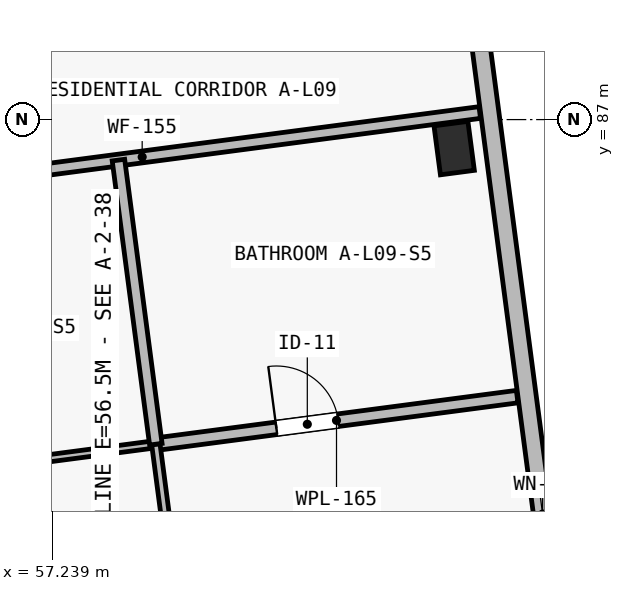
"""IFC4 building model, lengths in metres.
Left out: names, types, materials, properties, quantities, classifications, styles, units other than length and angle.
Written with IfcOpenShell. Run it as: python <this file> out.ifc"""

import sys

from ifc_helpers import new_model, si_unit, direction, frame, frame_2d, origin, origin_2d, place, context, subcontext, project, spatial, rectangle, extrude, element, fill, save


model = new_model("IFC4")
c1 = context("Model", 3, precision=1e-05, world=origin(), true_north=direction((0.0, 1.0)))
c2 = subcontext(c1, "Body", "Model", "MODEL_VIEW")
j1 = project(units=[si_unit("LENGTHUNIT", "METRE"), si_unit("PLANEANGLEUNIT", "RADIAN")], contexts=[c1])
p1 = place(None, origin())
s1 = spatial("IfcSite", under=j1, at=p1, CompositionType="ELEMENT")
p2 = place(p1, origin())
s2 = spatial("IfcBuilding", under=s1, at=p2, CompositionType="ELEMENT")
p3 = place(p2, frame((0.0, 0.0, 31.15)))
s3 = spatial("IfcBuildingStorey", under=s2, at=p3, CompositionType="ELEMENT", Elevation=31.15)
p4 = place(p3, frame((62.53, 86.625, 0.0), z_axis=(0.0, 0.0, 1.0), x_axis=(0.991444861374, 0.13052619222, 0.0)))
e1 = element("IfcColumn", 1, at=p4, inside=s3, PredefinedType="COLUMN", context=c2, shape_type="SweptSolid", body=[
    extrude(rectangle(XDim=0.45, YDim=0.65, at=origin_2d()), origin(), (0.0, 0.0, 1.0), 3.25),
])
p5 = place(p3, frame((61.39, 99.31, 0.0), z_axis=(0.0, 0.0, 1.0), x_axis=(0.13052411616, -0.99144513469, 0.0)))
e2 = element("IfcWall", 2, at=p5, inside=s3, PredefinedType="SOLIDWALL", context=c2, shape_type="SweptSolid", body=[
    extrude(rectangle(XDim=21.05, YDim=0.24, at=frame_2d((10.525, 0.0))), origin(), (0.0, 0.0, 1.0), 3.0),
])
p6 = place(p5, frame((2.63, 0.0, 0.52)))
e3 = element("IfcOpeningElement", 3, at=p6, cuts=e2, PredefinedType="OPENING", context=c2, shape_type="SweptSolid", body=[
    extrude(rectangle(XDim=0.68, YDim=2.24, at=frame_2d((0.34, 1.12))), frame((0.0, 0.135, 0.0), z_axis=(0.0, -1.0, 0.0), x_axis=(1.0, 0.0, 0.0)), (0.0, 0.0, 1.0), 0.27),
])
p7 = place(p5, frame((17.24, 0.0, 0.45)))
e4 = element("IfcOpeningElement", 4, at=p7, cuts=e2, PredefinedType="OPENING", context=c2, shape_type="SweptSolid", body=[
    extrude(rectangle(XDim=0.82, YDim=2.18, at=frame_2d((0.41, 1.09))), frame((0.0, 0.135, 0.0), z_axis=(0.0, -1.0, 0.0), x_axis=(1.0, 0.0, 0.0)), (0.0, 0.0, 1.0), 0.27),
])
p8 = place(p3, frame((53.984, 85.924, 0.0), z_axis=(0.0, 0.0, 1.0), x_axis=(0.991445946609, 0.130517948779, 0.0)))
e5 = element("IfcWall", 5, at=p8, inside=s3, PredefinedType="PARTITIONING", context=c2, shape_type="SweptSolid", body=[
    extrude(rectangle(XDim=8.96, YDim=0.155, at=frame_2d((4.48, 0.0))), origin(), (0.0, 0.0, 1.0), 2.97),
])
p9 = place(p8, frame((1.655, 0.0, 0.0)))
e6 = element("IfcOpeningElement", 6, at=p9, cuts=e5, PredefinedType="OPENING", context=c2, shape_type="SweptSolid", body=[
    extrude(rectangle(XDim=1.02, YDim=2.2, at=frame_2d((0.51, 1.1))), frame((0.0, 0.093, 0.0), z_axis=(0.0, -1.0, 0.0), x_axis=(1.0, 0.0, 0.0)), (0.0, 0.0, 1.0), 0.185),
])
p10 = place(p3, frame((54.357, 82.17, 0.0), z_axis=(0.0, 0.0, 1.0), x_axis=(0.991444014242, 0.130532626667, 0.0)))
e7 = element("IfcWall", 7, at=p10, inside=s3, PredefinedType="PARTITIONING", context=c2, shape_type="SweptSolid", body=[
    extrude(rectangle(XDim=4.285, YDim=0.095, at=frame_2d((2.143, 0.0))), origin(), (0.0, 0.0, 1.0), 2.97),
])
p11 = place(p10, frame((1.825, 0.0, 0.0)))
e8 = element("IfcOpeningElement", 8, at=p11, cuts=e7, PredefinedType="OPENING", context=c2, shape_type="SweptSolid", body=[
    extrude(rectangle(XDim=0.9, YDim=2.1, at=frame_2d((0.45, 1.05))), frame((0.0, 0.062, 0.0), z_axis=(0.0, -1.0, 0.0), x_axis=(1.0, 0.0, 0.0)), (0.0, 0.0, 1.0), 0.125),
])
p12 = place(p3, frame((58.605, 82.729, 0.0), z_axis=(0.0, 0.0, 1.0), x_axis=(0.991449269254, 0.130492706676, 0.0)))
e9 = element("IfcWall", 9, at=p12, inside=s3, PredefinedType="PLUMBINGWALL", context=c2, shape_type="SweptSolid", body=[
    extrude(rectangle(XDim=4.795, YDim=0.165, at=frame_2d((2.397, 0.0))), origin(), (0.0, 0.0, 1.0), 2.97),
])
p13 = place(p12, frame((1.6, 0.0, 0.0)))
e10 = element("IfcOpeningElement", 10, at=p13, cuts=e9, PredefinedType="OPENING", context=c2, shape_type="SweptSolid", body=[
    extrude(rectangle(XDim=0.82, YDim=2.08, at=frame_2d((0.41, 1.04))), frame((0.0, 0.097, 0.0), z_axis=(0.0, -1.0, 0.0), x_axis=(1.0, 0.0, 0.0)), (0.0, 0.0, 1.0), 0.195),
])
p14 = place(p3, frame((59.237, 77.931, 0.0), z_axis=(0.0, 0.0, 1.0), x_axis=(-0.130544545786, 0.991442444908, 0.0)))
e11 = element("IfcWall", 11, at=p14, inside=s3, PredefinedType="PARTITIONING", context=c2, shape_type="SweptSolid", body=[
    extrude(rectangle(XDim=4.84, YDim=0.11, at=frame_2d((2.42, 0.0))), origin(), (0.0, 0.0, 1.0), 2.97),
])
p15 = place(p14, frame((1.35, 0.0, 0.0)))
e12 = element("IfcOpeningElement", 12, at=p15, cuts=e11, PredefinedType="OPENING", context=c2, shape_type="SweptSolid", body=[
    extrude(rectangle(XDim=0.9, YDim=2.1, at=frame_2d((0.45, 1.05))), frame((0.0, 0.07, 0.0), z_axis=(0.0, -1.0, 0.0), x_axis=(1.0, 0.0, 0.0)), (0.0, 0.0, 1.0), 0.14),
])
p16 = place(p3, frame((58.605, 82.729, 0.0), z_axis=(0.0, 0.0, 1.0), x_axis=(-0.130496394248, 0.991448783896, 0.0)))
e13 = element("IfcWall", 13, at=p16, inside=s3, PredefinedType="PLUMBINGWALL", context=c2, shape_type="SweptSolid", body=[
    extrude(rectangle(XDim=3.77, YDim=0.165, at=frame_2d((1.885, 0.0))), origin(), (0.0, 0.0, 1.0), 2.97),
])
p17 = place(p7, origin())
e14 = element("IfcWindow", 14, at=p17, inside=s3, PartitioningType="SINGLE_PANEL", PredefinedType="WINDOW", context=c2, shape_type="SweptSolid", body=[
    extrude(rectangle(XDim=0.82, YDim=2.18, at=frame_2d((0.41, 1.09))), frame((0.0, 0.03, 0.0), z_axis=(0.0, -1.0, 0.0), x_axis=(1.0, 0.0, 0.0)), (0.0, 0.0, 1.0), 0.06),
])
fill(e4, e14)
p18 = place(p13, origin())
e15 = element("IfcDoor", 15, at=p18, inside=s3, OperationType="SINGLE_SWING_LEFT", PredefinedType="DOOR", context=c2, shape_type="SweptSolid", body=[
    extrude(rectangle(XDim=0.82, YDim=2.08, at=frame_2d((0.41, 1.04))), frame((0.0, 0.025, 0.0), z_axis=(0.0, -1.0, 0.0), x_axis=(1.0, 0.0, 0.0)), (0.0, 0.0, 1.0), 0.05),
])
fill(e10, e15)
save(model, sys.argv[1])
